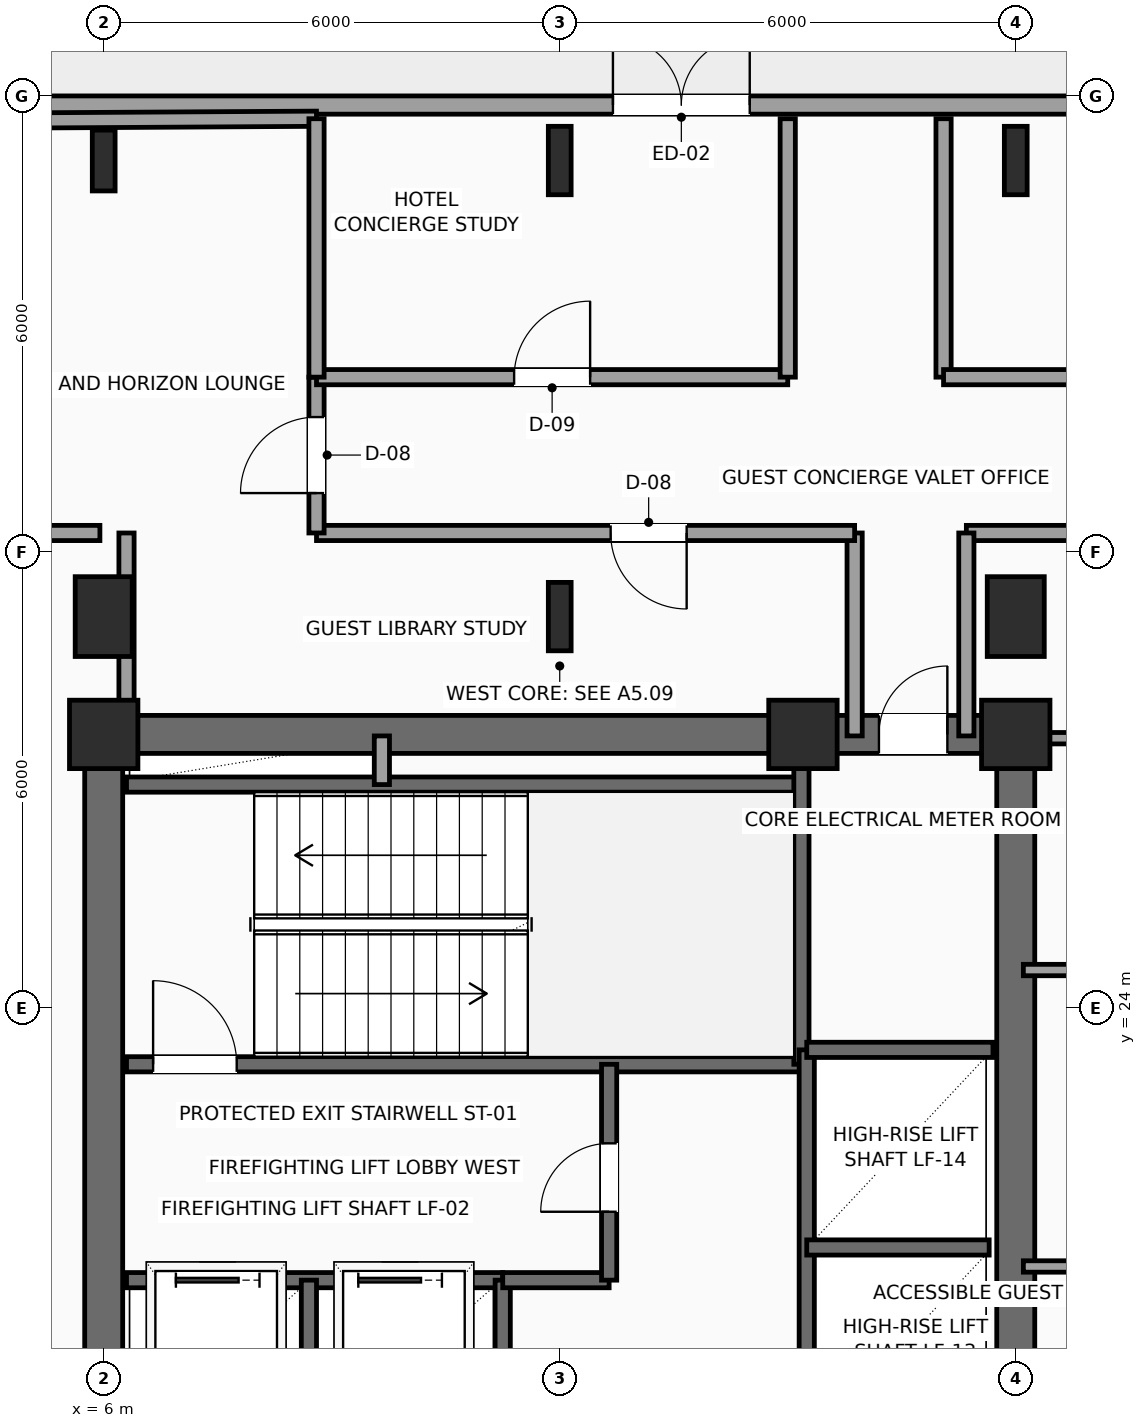
"""IFC4 building model, lengths in metres.
Left out: names, types, materials, properties, quantities, classifications, styles, units other than length and angle.
Written with IfcOpenShell. Run it as: python <this file> out.ifc"""

import sys

from ifc_helpers import new_model, si_unit, direction, frame, frame_2d, origin, origin_2d, place, context, subcontext, project, spatial, rectangle, i_section, extrude, element, fill, save


model = new_model("IFC4")
c1 = context("Model", 3, precision=1e-05, world=origin(), true_north=direction((0.0, 1.0)))
c2 = subcontext(c1, "Body", "Model", "MODEL_VIEW")
j1 = project(units=[si_unit("LENGTHUNIT", "METRE"), si_unit("PLANEANGLEUNIT", "RADIAN")], contexts=[c1])
p1 = place(None, origin())
s1 = spatial("IfcSite", under=j1, at=p1, CompositionType="ELEMENT")
p2 = place(p1, origin())
s2 = spatial("IfcBuilding", under=s1, at=p2, CompositionType="ELEMENT")
p3 = place(p2, frame((0.0, 0.0, 169.2)))
s3 = spatial("IfcBuildingStorey", under=s2, at=p3, CompositionType="ELEMENT", Elevation=169.2)
for number, where, z_axis, x_axis in (
    (1, (6.0, 27.6, 0.0), (0.0, 0.0, 1.0), (1.0, 0.0, 0.0)),
    (2, (15.2, 27.6, 0.0), (0.0, 0.0, 1.0), (1.0, 0.0, 0.0)),
    (3, (18.0, 27.6, 0.0), (0.0, 0.0, 1.0), (1.0, 0.0, 0.0)),
):
    element("IfcColumn", number, at=place(p3, frame(where, z_axis=z_axis, x_axis=x_axis)), inside=s3, PredefinedType="COLUMN", context=c2, shape_type="SweptSolid", body=[
        extrude(rectangle(XDim=0.9, YDim=0.9, at=origin_2d()), origin(), (0.0, 0.0, 1.0), 3.75),
    ])
p4 = place(p3, frame((6.0, 29.15, 0.0), z_axis=(0.0, 0.0, 1.0), x_axis=(1.0, 0.0, 0.0)))
e4 = element("IfcColumn", 4, at=p4, inside=s3, PredefinedType="COLUMN", context=c2, shape_type="SweptSolid", body=[
    extrude(rectangle(XDim=0.75, YDim=1.05, at=origin_2d()), origin(), (0.0, 0.0, 1.0), 3.75),
])
p5 = place(p3, frame((6.0, 35.15, 0.0), z_axis=(0.0, 0.0, 1.0), x_axis=(1.0, 0.0, 0.0)))
e5 = element("IfcColumn", 5, at=p5, inside=s3, PredefinedType="COLUMN", context=c2, shape_type="SweptSolid", body=[
    extrude(i_section(OverallWidth=0.3, OverallDepth=0.8, WebThickness=0.018, FlangeThickness=0.033, FilletRadius=0.03, at=origin_2d()), origin(), (0.0, 0.0, 1.0), 3.75),
])
for number, where, z_axis, x_axis in (
    (6, (12.0, 29.15, 0.0), (0.0, 0.0, 1.0), (1.0, 0.0, 0.0)),
    (7, (12.0, 35.15, 0.0), (0.0, 0.0, 1.0), (1.0, 0.0, 0.0)),
):
    element("IfcColumn", number, at=place(p3, frame(where, z_axis=z_axis, x_axis=x_axis)), inside=s3, PredefinedType="COLUMN", context=c2, shape_type="SweptSolid", body=[
        extrude(i_section(OverallWidth=0.3, OverallDepth=0.9, WebThickness=0.019, FlangeThickness=0.035, FilletRadius=0.03, at=origin_2d()), origin(), (0.0, 0.0, 1.0), 3.75),
    ])
p6 = place(p3, frame((18.0, 29.15, 0.0), z_axis=(0.0, 0.0, 1.0), x_axis=(1.0, 0.0, 0.0)))
e8 = element("IfcColumn", 8, at=p6, inside=s3, PredefinedType="COLUMN", context=c2, shape_type="SweptSolid", body=[
    extrude(rectangle(XDim=0.75, YDim=1.05, at=origin_2d()), origin(), (0.0, 0.0, 1.0), 3.75),
])
p7 = place(p3, frame((18.0, 35.15, 0.0), z_axis=(0.0, 0.0, 1.0), x_axis=(1.0, 0.0, 0.0)))
e9 = element("IfcColumn", 9, at=p7, inside=s3, PredefinedType="COLUMN", context=c2, shape_type="SweptSolid", body=[
    extrude(i_section(OverallWidth=0.3, OverallDepth=0.9, WebThickness=0.019, FlangeThickness=0.035, FilletRadius=0.03, at=origin_2d()), origin(), (0.0, 0.0, 1.0), 3.75),
])
p8 = place(p3, frame((3.0, 35.88, 0.0), z_axis=(0.0, 0.0, 1.0), x_axis=(1.0, 0.0, 0.0)))
e10 = element("IfcWall", 10, at=p8, inside=s3, PredefinedType="SOLIDWALL", context=c2, shape_type="SweptSolid", body=[
    extrude(rectangle(XDim=18.0, YDim=0.24, at=frame_2d((9.0, 0.0))), origin(), (0.0, 0.0, 1.0), 3.54),
])
p9 = place(p8, frame((9.7, 0.0, 0.0)))
e11 = element("IfcOpeningElement", 11, at=p9, cuts=e10, PredefinedType="OPENING", context=c2, shape_type="SweptSolid", body=[
    extrude(rectangle(XDim=1.8, YDim=2.4, at=frame_2d((0.9, 1.2))), frame((0.0, 0.13, 0.0), z_axis=(0.0, -1.0, 0.0), x_axis=(1.0, 0.0, 0.0)), (0.0, 0.0, 1.0), 0.26),
])
p10 = place(p3, frame((6.0, 27.6, 0.0), z_axis=(0.0, 0.0, 1.0), x_axis=(1.0, 0.0, 0.0)))
e12 = element("IfcWall", 12, at=p10, inside=s3, PredefinedType="SHEAR", context=c2, shape_type="SweptSolid", body=[
    extrude(rectangle(XDim=12.0, YDim=0.5, at=frame_2d((6.0, 0.0))), origin(), (0.0, 0.0, 1.0), 3.54),
])
p11 = place(p10, frame((10.2, 0.0, 0.0)))
e13 = element("IfcOpeningElement", 13, at=p11, cuts=e12, PredefinedType="OPENING", context=c2, shape_type="SweptSolid", body=[
    extrude(rectangle(XDim=0.9, YDim=2.15, at=frame_2d((0.45, 1.075))), frame((0.0, 0.26, 0.0), z_axis=(0.0, -1.0, 0.0), x_axis=(1.0, 0.0, 0.0)), (0.0, 0.0, 1.0), 0.52),
])
for number, where, z_axis, x_axis in (
    (14, (6.0, 18.0, 0.0), (0.0, 0.0, 1.0), (0.0, 1.0, 0.0)),
    (15, (18.0, 18.0, 0.0), (0.0, 0.0, 1.0), (0.0, 1.0, 0.0)),
):
    element("IfcWall", number, at=place(p3, frame(where, z_axis=z_axis, x_axis=x_axis)), inside=s3, PredefinedType="SHEAR", context=c2, shape_type="SweptSolid", body=[
        extrude(rectangle(XDim=9.6, YDim=0.5, at=frame_2d((4.8, 0.0))), origin(), (0.0, 0.0, 1.0), 3.54),
    ])
p12 = place(p3, frame((6.3, 23.26, 0.0), z_axis=(0.0, 0.0, 1.0), x_axis=(1.0, 0.0, 0.0)))
e16 = element("IfcWall", 16, at=p12, inside=s3, PredefinedType="SHEAR", context=c2, shape_type="SweptSolid", body=[
    extrude(rectangle(XDim=8.88, YDim=0.2, at=frame_2d((4.44, 0.0))), origin(), (0.0, 0.0, 1.0), 3.54),
])
p13 = place(p12, frame((0.35, 0.0, 0.0)))
e17 = element("IfcOpeningElement", 17, at=p13, cuts=e16, PredefinedType="OPENING", context=c2, shape_type="SweptSolid", body=[
    extrude(rectangle(XDim=1.1, YDim=2.2, at=frame_2d((0.55, 1.1))), frame((0.0, 0.11, 0.0), z_axis=(0.0, -1.0, 0.0), x_axis=(1.0, 0.0, 0.0)), (0.0, 0.0, 1.0), 0.22),
])
p14 = place(p3, frame((6.3, 26.94, 0.0), z_axis=(0.0, 0.0, 1.0), x_axis=(1.0, 0.0, 0.0)))
e18 = element("IfcWall", 18, at=p14, inside=s3, PredefinedType="SHEAR", context=c2, shape_type="SweptSolid", body=[
    extrude(rectangle(XDim=8.88, YDim=0.2, at=frame_2d((4.44, 0.0))), origin(), (0.0, 0.0, 1.0), 3.54),
])
p15 = place(p3, frame((15.18, 23.26, 0.0), z_axis=(0.0, 0.0, 1.0), x_axis=(0.0, 1.0, 0.0)))
e19 = element("IfcWall", 19, at=p15, inside=s3, PredefinedType="SHEAR", context=c2, shape_type="SweptSolid", body=[
    extrude(rectangle(XDim=4.04, YDim=0.2, at=frame_2d((2.02, 0.0))), origin(), (0.0, 0.0, 1.0), 3.54),
])
p16 = place(p3, frame((6.3, 20.42, 0.0), z_axis=(0.0, 0.0, 1.0), x_axis=(1.0, 0.0, 0.0)))
e20 = element("IfcWall", 20, at=p16, inside=s3, PredefinedType="SHEAR", context=c2, shape_type="SweptSolid", body=[
    extrude(rectangle(XDim=4.95, YDim=0.2, at=frame_2d((2.475, 0.0))), origin(), (0.0, 0.0, 1.0), 3.54),
])
p17 = place(p16, frame((0.65, 0.0, 0.0)))
e21 = element("IfcOpeningElement", 21, at=p17, cuts=e20, PredefinedType="OPENING", context=c2, shape_type="SweptSolid", body=[
    extrude(rectangle(XDim=1.1, YDim=2.2, at=frame_2d((0.55, 1.1))), frame((0.0, 0.11, 0.0), z_axis=(0.0, -1.0, 0.0), x_axis=(1.0, 0.0, 0.0)), (0.0, 0.0, 1.0), 0.22),
])
p18 = place(p16, frame((3.05, 0.0, 0.0)))
e22 = element("IfcOpeningElement", 22, at=p18, cuts=e20, PredefinedType="OPENING", context=c2, shape_type="SweptSolid", body=[
    extrude(rectangle(XDim=1.1, YDim=2.2, at=frame_2d((0.55, 1.1))), frame((0.0, 0.11, 0.0), z_axis=(0.0, -1.0, 0.0), x_axis=(1.0, 0.0, 0.0)), (0.0, 0.0, 1.0), 0.22),
])
for number, where, z_axis, x_axis in (
    (23, (8.7, 18.25, 0.0), (0.0, 0.0, 1.0), (0.0, 1.0, 0.0)),
    (24, (11.25, 18.25, 0.0), (0.0, 0.0, 1.0), (0.0, 1.0, 0.0)),
):
    element("IfcWall", number, at=place(p3, frame(where, z_axis=z_axis, x_axis=x_axis)), inside=s3, PredefinedType="SHEAR", context=c2, shape_type="SweptSolid", body=[
        extrude(rectangle(XDim=2.17, YDim=0.2, at=frame_2d((1.085, 0.0))), origin(), (0.0, 0.0, 1.0), 3.54),
    ])
p19 = place(p3, frame((11.25, 20.42, 0.0), z_axis=(0.0, 0.0, 1.0), x_axis=(1.0, 0.0, 0.0)))
e25 = element("IfcWall", 25, at=p19, inside=s3, PredefinedType="SHEAR", context=c2, shape_type="SweptSolid", body=[
    extrude(rectangle(XDim=1.4, YDim=0.2, at=frame_2d((0.7, 0.0))), origin(), (0.0, 0.0, 1.0), 3.54),
])
p20 = place(p3, frame((12.65, 20.42, 0.0), z_axis=(0.0, 0.0, 1.0), x_axis=(0.0, 1.0, 0.0)))
e26 = element("IfcWall", 26, at=p20, inside=s3, PredefinedType="SHEAR", context=c2, shape_type="SweptSolid", body=[
    extrude(rectangle(XDim=2.84, YDim=0.2, at=frame_2d((1.42, 0.0))), origin(), (0.0, 0.0, 1.0), 3.54),
])
p21 = place(p20, frame((0.9, 0.0, 0.0)))
e27 = element("IfcOpeningElement", 27, at=p21, cuts=e26, PredefinedType="OPENING", context=c2, shape_type="SweptSolid", body=[
    extrude(rectangle(XDim=0.9, YDim=2.15, at=frame_2d((0.45, 1.075))), frame((0.0, 0.11, 0.0), z_axis=(0.0, -1.0, 0.0), x_axis=(1.0, 0.0, 0.0)), (0.0, 0.0, 1.0), 0.22),
])
p22 = place(p3, frame((9.66, 26.94, 0.0), z_axis=(0.0, 0.0, 1.0), x_axis=(0.0, 1.0, 0.0)))
e28 = element("IfcWall", 28, at=p22, inside=s3, PredefinedType="SOLIDWALL", context=c2, shape_type="SweptSolid", body=[
    extrude(rectangle(XDim=0.64, YDim=0.2, at=frame_2d((0.32, 0.0))), origin(), (0.0, 0.0, 1.0), 3.54),
])
p23 = place(p3, frame((15.25, 18.25, 0.0), z_axis=(0.0, 0.0, 1.0), x_axis=(0.0, 1.0, 0.0)))
e29 = element("IfcWall", 29, at=p23, inside=s3, PredefinedType="SHEAR", context=c2, shape_type="SweptSolid", body=[
    extrude(rectangle(XDim=5.2, YDim=0.2, at=frame_2d((2.6, 0.0))), origin(), (0.0, 0.0, 1.0), 3.54),
])
p24 = place(p3, frame((15.25, 20.85, 0.0), z_axis=(0.0, 0.0, 1.0), x_axis=(1.0, 0.0, 0.0)))
e30 = element("IfcWall", 30, at=p24, inside=s3, PredefinedType="SHEAR", context=c2, shape_type="SweptSolid", body=[
    extrude(rectangle(XDim=2.4, YDim=0.2, at=frame_2d((1.2, 0.0))), origin(), (0.0, 0.0, 1.0), 3.54),
])
p25 = place(p3, frame((15.25, 23.45, 0.0), z_axis=(0.0, 0.0, 1.0), x_axis=(1.0, 0.0, 0.0)))
e31 = element("IfcWall", 31, at=p25, inside=s3, PredefinedType="SHEAR", context=c2, shape_type="SweptSolid", body=[
    extrude(rectangle(XDim=2.45, YDim=0.2, at=frame_2d((1.225, 0.0))), origin(), (0.0, 0.0, 1.0), 3.54),
])
p26 = place(p3, frame((22.25, 30.25, 0.0), z_axis=(0.0, 0.0, 1.0), x_axis=(-1.0, 0.0, 0.0)))
e32 = element("IfcWall", 32, at=p26, inside=s3, PredefinedType="PARTITIONING", context=c2, shape_type="SweptSolid", body=[
    extrude(rectangle(XDim=4.9, YDim=0.2, at=frame_2d((2.45, 0.0))), origin(), (0.0, 0.0, 1.0), 3.54),
])
p27 = place(p26, frame((1.95, 0.0, 0.0)))
e33 = element("IfcOpeningElement", 33, at=p27, cuts=e32, PredefinedType="OPENING", context=c2, shape_type="SweptSolid", body=[
    extrude(rectangle(XDim=1.0, YDim=2.2, at=frame_2d((0.5, 1.1))), frame((0.0, 0.11, 0.0), z_axis=(0.0, -1.0, 0.0), x_axis=(1.0, 0.0, 0.0)), (0.0, 0.0, 1.0), 0.22),
])
for number, where, z_axis, x_axis in (
    (34, (17.35, 30.25, 0.0), (0.0, 0.0, 1.0), (0.0, -1.0, 0.0)),
    (35, (15.88, 27.58, 0.0), (0.0, 0.0, 1.0), (0.0, 1.0, 0.0)),
):
    element("IfcWall", number, at=place(p3, frame(where, z_axis=z_axis, x_axis=x_axis)), inside=s3, PredefinedType="PARTITIONING", context=c2, shape_type="SweptSolid", body=[
        extrude(rectangle(XDim=2.67, YDim=0.2, at=frame_2d((1.335, 0.0))), origin(), (0.0, 0.0, 1.0), 3.54),
    ])
p28 = place(p3, frame((15.88, 30.25, 0.0), z_axis=(0.0, 0.0, 1.0), x_axis=(-1.0, 0.0, 0.0)))
e36 = element("IfcWall", 36, at=p28, inside=s3, PredefinedType="PARTITIONING", context=c2, shape_type="SweptSolid", body=[
    extrude(rectangle(XDim=7.08, YDim=0.2, at=frame_2d((3.54, 0.0))), origin(), (0.0, 0.0, 1.0), 3.54),
])
p29 = place(p28, frame((2.21, 0.0, 0.0)))
e37 = element("IfcOpeningElement", 37, at=p29, cuts=e36, PredefinedType="OPENING", context=c2, shape_type="SweptSolid", body=[
    extrude(rectangle(XDim=1.0, YDim=2.2, at=frame_2d((0.5, 1.1))), frame((0.0, 0.11, 0.0), z_axis=(0.0, -1.0, 0.0), x_axis=(1.0, 0.0, 0.0)), (0.0, 0.0, 1.0), 0.22),
])
p30 = place(p3, frame((8.8, 30.25, 0.0), z_axis=(0.0, 0.0, 1.0), x_axis=(0.0, 1.0, 0.0)))
e38 = element("IfcWall", 38, at=p30, inside=s3, PredefinedType="PARTITIONING", context=c2, shape_type="SweptSolid", body=[
    extrude(rectangle(XDim=2.05, YDim=0.2, at=frame_2d((1.025, 0.0))), origin(), (0.0, 0.0, 1.0), 3.54),
])
p31 = place(p30, frame((0.525, 0.0, 0.0)))
e39 = element("IfcOpeningElement", 39, at=p31, cuts=e38, PredefinedType="OPENING", context=c2, shape_type="SweptSolid", body=[
    extrude(rectangle(XDim=1.0, YDim=2.2, at=frame_2d((0.5, 1.1))), frame((0.0, 0.11, 0.0), z_axis=(0.0, -1.0, 0.0), x_axis=(1.0, 0.0, 0.0)), (0.0, 0.0, 1.0), 0.22),
])
p32 = place(p3, frame((8.8, 32.3, 0.0), z_axis=(0.0, 0.0, 1.0), x_axis=(1.0, 0.0, 0.0)))
e40 = element("IfcWall", 40, at=p32, inside=s3, PredefinedType="PARTITIONING", context=c2, shape_type="SweptSolid", body=[
    extrude(rectangle(XDim=6.2, YDim=0.2, at=frame_2d((3.1, 0.0))), origin(), (0.0, 0.0, 1.0), 3.132),
])
p33 = place(p32, frame((2.6, 0.0, 0.0)))
e41 = element("IfcOpeningElement", 41, at=p33, cuts=e40, PredefinedType="OPENING", context=c2, shape_type="SweptSolid", body=[
    extrude(rectangle(XDim=1.0, YDim=2.2, at=frame_2d((0.5, 1.1))), frame((0.0, 0.11, 0.0), z_axis=(0.0, -1.0, 0.0), x_axis=(1.0, 0.0, 0.0)), (0.0, 0.0, 1.0), 0.22),
])
for number, where, z_axis, x_axis in (
    (42, (15.0, 32.3, 0.0), (0.0, 0.0, 1.0), (0.0, 1.0, 0.0)),
    (43, (17.05, 35.7, 0.0), (0.0, 0.0, 1.0), (0.0, -1.0, 0.0)),
):
    element("IfcWall", number, at=place(p3, frame(where, z_axis=z_axis, x_axis=x_axis)), inside=s3, PredefinedType="PARTITIONING", context=c2, shape_type="SweptSolid", body=[
        extrude(rectangle(XDim=3.4, YDim=0.2, at=frame_2d((1.7, 0.0))), origin(), (0.0, 0.0, 1.0), 3.54),
    ])
p34 = place(p3, frame((17.05, 32.3, 0.0), z_axis=(0.0, 0.0, 1.0), x_axis=(1.0, 0.0, 0.0)))
e44 = element("IfcWall", 44, at=p34, inside=s3, PredefinedType="PARTITIONING", context=c2, shape_type="SweptSolid", body=[
    extrude(rectangle(XDim=5.2, YDim=0.2, at=frame_2d((2.6, 0.0))), origin(), (0.0, 0.0, 1.0), 3.132),
])
p35 = place(p34, frame((2.1, 0.0, 0.0)))
e45 = element("IfcOpeningElement", 45, at=p35, cuts=e44, PredefinedType="OPENING", context=c2, shape_type="SweptSolid", body=[
    extrude(rectangle(XDim=1.0, YDim=2.2, at=frame_2d((0.5, 1.1))), frame((0.0, 0.11, 0.0), z_axis=(0.0, -1.0, 0.0), x_axis=(1.0, 0.0, 0.0)), (0.0, 0.0, 1.0), 0.22),
])
for number, where, z_axis, x_axis in (
    (46, (18.1, 20.6, 0.0), (0.0, 0.0, 1.0), (1.0, 0.0, 0.0)),
    (47, (18.1, 24.5, 0.0), (0.0, 0.0, 1.0), (1.0, 0.0, 0.0)),
    (48, (18.1, 27.55, 0.0), (0.0, 0.0, 1.0), (1.0, 0.0, 0.0)),
):
    element("IfcWall", number, at=place(p3, frame(where, z_axis=z_axis, x_axis=x_axis)), inside=s3, PredefinedType="PARTITIONING", context=c2, shape_type="SweptSolid", body=[
        extrude(rectangle(XDim=3.25, YDim=0.15, at=frame_2d((1.625, 0.0))), origin(), (0.0, 0.0, 1.0), 3.54),
    ])
p36 = place(p3, frame((0.3, 30.25, 0.0), z_axis=(0.0, 0.0, 1.0), x_axis=(1.0, 0.0, 0.0)))
e49 = element("IfcWall", 49, at=p36, inside=s3, PredefinedType="PARTITIONING", context=c2, shape_type="SweptSolid", body=[
    extrude(rectangle(XDim=5.65, YDim=0.2, at=frame_2d((2.825, 0.0))), origin(), (0.0, 0.0, 1.0), 3.54),
])
p37 = place(p3, frame((6.3, 27.65, 0.0), z_axis=(0.0, 0.0, 1.0), x_axis=(0.0, 1.0, 0.0)))
e50 = element("IfcWall", 50, at=p37, inside=s3, PredefinedType="PARTITIONING", context=c2, shape_type="SweptSolid", body=[
    extrude(rectangle(XDim=2.6, YDim=0.2, at=frame_2d((1.3, 0.0))), origin(), (0.0, 0.0, 1.0), 3.132),
])
p38 = place(p3, frame((0.35, 35.65, 0.0), z_axis=(0.0, 0.0, 1.0), x_axis=(0.99998245966, 0.005922868574, 0.0)))
e51 = element("IfcWall", 51, at=p38, inside=s3, PredefinedType="PARTITIONING", context=c2, shape_type="SweptSolid", body=[
    extrude(rectangle(XDim=8.45, YDim=0.2, at=frame_2d((4.225, 0.0))), origin(), (0.0, 0.0, 1.0), 3.54),
])
p39 = place(p3, frame((8.8, 32.3, 0.0), z_axis=(0.0, 0.0, 1.0), x_axis=(0.0, 1.0, 0.0)))
e52 = element("IfcWall", 52, at=p39, inside=s3, PredefinedType="PARTITIONING", context=c2, shape_type="SweptSolid", body=[
    extrude(rectangle(XDim=3.4, YDim=0.2, at=frame_2d((1.7, 0.0))), origin(), (0.0, 0.0, 1.0), 3.54),
])
p40 = place(p9, origin())
e53 = element("IfcDoor", 53, at=p40, inside=s3, OperationType="DOUBLE_DOOR_SINGLE_SWING", PredefinedType="DOOR", context=c2, shape_type="SweptSolid", body=[
    extrude(rectangle(XDim=1.8, YDim=2.4, at=frame_2d((0.9, 1.2))), frame((0.0, 0.025, 0.0), z_axis=(0.0, -1.0, 0.0), x_axis=(1.0, 0.0, 0.0)), (0.0, 0.0, 1.0), 0.05),
])
fill(e11, e53)
p41 = place(p11, origin())
e54 = element("IfcDoor", 54, at=p41, inside=s3, OperationType="SINGLE_SWING_RIGHT", PredefinedType="DOOR", context=c2, shape_type="SweptSolid", body=[
    extrude(rectangle(XDim=0.9, YDim=2.15, at=frame_2d((0.45, 1.075))), frame((0.0, 0.025, 0.0), z_axis=(0.0, -1.0, 0.0), x_axis=(1.0, 0.0, 0.0)), (0.0, 0.0, 1.0), 0.05),
])
fill(e13, e54)
p42 = place(p13, origin())
e55 = element("IfcDoor", 55, at=p42, inside=s3, OperationType="SINGLE_SWING_LEFT", PredefinedType="DOOR", context=c2, shape_type="SweptSolid", body=[
    extrude(rectangle(XDim=1.1, YDim=2.2, at=frame_2d((0.55, 1.1))), frame((0.0, 0.025, 0.0), z_axis=(0.0, -1.0, 0.0), x_axis=(1.0, 0.0, 0.0)), (0.0, 0.0, 1.0), 0.05),
])
fill(e17, e55)
p43 = place(p17, origin())
e56 = element("IfcDoor", 56, at=p43, inside=s3, OperationType="SLIDING_TO_LEFT", PredefinedType="DOOR", context=c2, shape_type="SweptSolid", body=[
    extrude(rectangle(XDim=1.1, YDim=2.2, at=frame_2d((0.55, 1.1))), frame((0.0, 0.025, 0.0), z_axis=(0.0, -1.0, 0.0), x_axis=(1.0, 0.0, 0.0)), (0.0, 0.0, 1.0), 0.05),
])
fill(e21, e56)
p44 = place(p18, origin())
e57 = element("IfcDoor", 57, at=p44, inside=s3, OperationType="SLIDING_TO_LEFT", PredefinedType="DOOR", context=c2, shape_type="SweptSolid", body=[
    extrude(rectangle(XDim=1.1, YDim=2.2, at=frame_2d((0.55, 1.1))), frame((0.0, 0.025, 0.0), z_axis=(0.0, -1.0, 0.0), x_axis=(1.0, 0.0, 0.0)), (0.0, 0.0, 1.0), 0.05),
])
fill(e22, e57)
p45 = place(p21, origin())
e58 = element("IfcDoor", 58, at=p45, inside=s3, OperationType="SINGLE_SWING_LEFT", PredefinedType="DOOR", context=c2, shape_type="SweptSolid", body=[
    extrude(rectangle(XDim=0.9, YDim=2.15, at=frame_2d((0.45, 1.075))), frame((0.0, 0.025, 0.0), z_axis=(0.0, -1.0, 0.0), x_axis=(1.0, 0.0, 0.0)), (0.0, 0.0, 1.0), 0.05),
])
fill(e27, e58)
p46 = place(p29, origin())
e59 = element("IfcDoor", 59, at=p46, inside=s3, OperationType="SINGLE_SWING_LEFT", PredefinedType="DOOR", context=c2, shape_type="SweptSolid", body=[
    extrude(rectangle(XDim=1.0, YDim=2.2, at=frame_2d((0.5, 1.1))), frame((0.0, 0.025, 0.0), z_axis=(0.0, -1.0, 0.0), x_axis=(1.0, 0.0, 0.0)), (0.0, 0.0, 1.0), 0.05),
])
fill(e37, e59)
p47 = place(p31, origin())
e60 = element("IfcDoor", 60, at=p47, inside=s3, OperationType="SINGLE_SWING_LEFT", PredefinedType="DOOR", context=c2, shape_type="SweptSolid", body=[
    extrude(rectangle(XDim=1.0, YDim=2.2, at=frame_2d((0.5, 1.1))), frame((0.0, 0.025, 0.0), z_axis=(0.0, -1.0, 0.0), x_axis=(1.0, 0.0, 0.0)), (0.0, 0.0, 1.0), 0.05),
])
fill(e39, e60)
p48 = place(p33, origin())
e61 = element("IfcDoor", 61, at=p48, inside=s3, OperationType="SINGLE_SWING_RIGHT", PredefinedType="DOOR", context=c2, shape_type="SweptSolid", body=[
    extrude(rectangle(XDim=1.0, YDim=2.2, at=frame_2d((0.5, 1.1))), frame((0.0, 0.025, 0.0), z_axis=(0.0, -1.0, 0.0), x_axis=(1.0, 0.0, 0.0)), (0.0, 0.0, 1.0), 0.05),
])
fill(e41, e61)
save(model, sys.argv[1])
